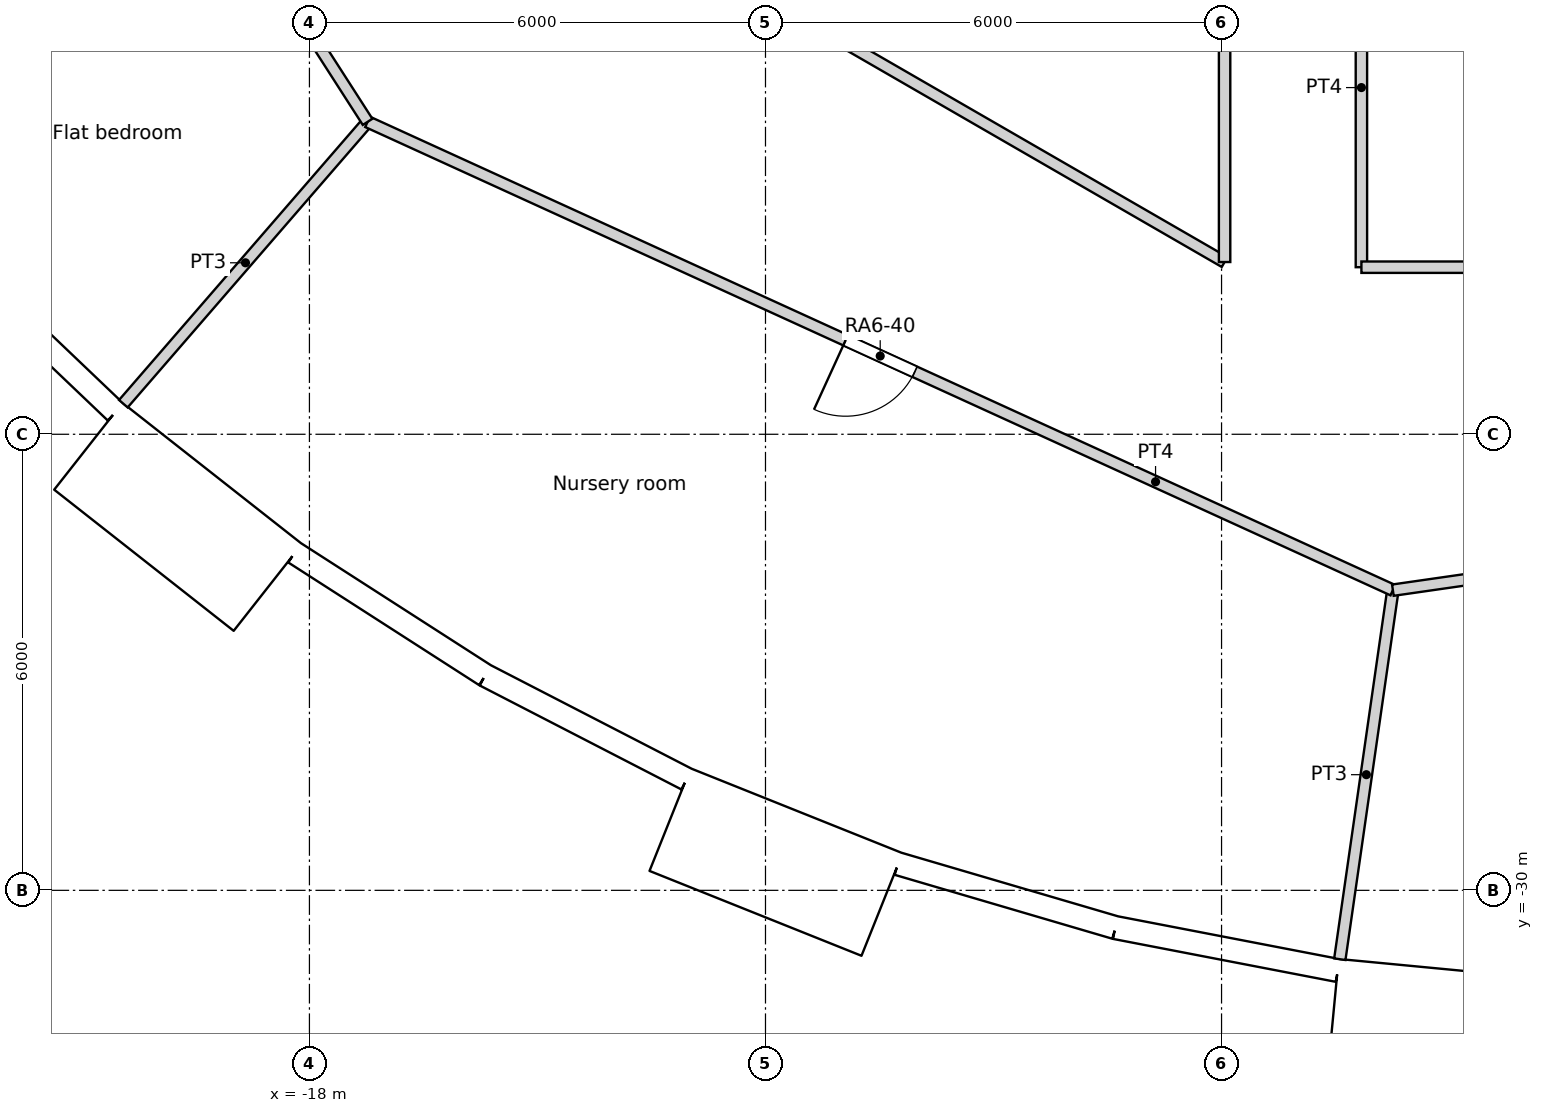
"""IFC4 building model, lengths in metres.
Left out: names, types, materials, properties, quantities, classifications, styles, units other than length and angle.
Written with IfcOpenShell. Run it as: python <this file> out.ifc"""

import sys

from ifc_helpers import new_model, si_unit, direction, frame, frame_2d, origin, origin_2d, place, context, subcontext, project, spatial, rectangle, circle, extrude, element, fill, save


model = new_model("IFC4")
c1 = context("Model", 3, precision=1e-05, world=origin(), true_north=direction((0.0, 1.0)))
c2 = subcontext(c1, "Body", "Model", "MODEL_VIEW")
j1 = project(units=[si_unit("LENGTHUNIT", "METRE"), si_unit("PLANEANGLEUNIT", "RADIAN")], contexts=[c1])
p1 = place(None, origin())
s1 = spatial("IfcSite", under=j1, at=p1, CompositionType="ELEMENT")
p2 = place(p1, origin())
s2 = spatial("IfcBuilding", under=s1, at=p2, CompositionType="ELEMENT")
p3 = place(p2, frame((0.0, 0.0, 82.2)))
s3 = spatial("IfcBuildingStorey", under=s2, at=p3, CompositionType="ELEMENT", Elevation=82.2)
for number, where, z_axis, x_axis in (
    (1, (-19.826, -22.88, 0.0), (0.0, 0.0, 1.0), (1.0, 0.0, 0.0)),
    (2, (-15.137, -26.219, 0.0), (0.0, 0.0, 1.0), (1.0, 0.0, 0.0)),
    (3, (-9.902, -28.61, 0.0), (0.0, 0.0, 1.0), (1.0, 0.0, 0.0)),
    (4, (-4.309, -29.966, 0.0), (0.0, 0.0, 1.0), (1.0, 0.0, 0.0)),
):
    element("IfcColumn", number, at=place(p3, frame(where, z_axis=z_axis, x_axis=x_axis)), inside=s3, PredefinedType="COLUMN", context=c2, shape_type="SweptSolid", body=[
        extrude(circle(Radius=0.6, at=origin_2d()), origin(), (0.0, 0.0, 1.0), 3.6),
    ])
for number, where, z_axis, x_axis in (
    (5, (-12.274, -21.259, 0.0), (0.0, 0.0, 1.0), (1.0, 0.0, 0.0)),
    (6, (-7.04, -23.516, 0.0), (0.0, 0.0, 1.0), (1.0, 0.0, 0.0)),
):
    element("IfcColumn", number, at=place(p3, frame(where, z_axis=z_axis, x_axis=x_axis)), inside=s3, PredefinedType="COLUMN", context=c2, shape_type="SweptSolid", body=[
        extrude(circle(Radius=0.65, at=origin_2d()), origin(), (0.0, 0.0, 1.0), 3.6),
    ])
p4 = place(p3, frame((-4.188, -18.35, 0.0), z_axis=(0.0, 0.0, 1.0), x_axis=(1.0, 0.0, 0.0)))
e7 = element("IfcColumn", 7, at=p4, inside=s3, PredefinedType="COLUMN", context=c2, shape_type="SweptSolid", body=[
    extrude(circle(Radius=0.7, at=origin_2d()), origin(), (0.0, 0.0, 1.0), 3.6),
])
p5 = place(p3, frame((-22.707, -21.651, 0.0), z_axis=(0.0, 0.0, 1.0), x_axis=(0.723744206617, -0.690068346896, 0.0)))
e8 = element("IfcWall", 8, at=p5, inside=s3, PredefinedType="SOLIDWALL", context=c2, shape_type="SweptSolid", body=[
    extrude(rectangle(XDim=2.98, YDim=0.3, at=frame_2d((1.49, 0.0))), origin(), (0.0, 0.0, 1.0), 3.15),
])
p6 = place(p5, frame((1.49, 0.0, 1.55)))
e9 = element("IfcOpeningElement", 9, at=p6, cuts=e8, PredefinedType="OPENING", context=c2, shape_type="SweptSolid", body=[
    extrude(circle(Radius=0.9, at=origin_2d()), frame((0.0, 0.16, 0.0), z_axis=(0.0, -1.0, 0.0), x_axis=(1.0, 0.0, 0.0)), (0.0, 0.0, 1.0), 0.32),
])
p7 = place(p3, frame((-20.907, -24.159, -0.45), z_axis=(0.0, 0.0, 1.0), x_axis=(0.786049992888, -0.618162930529, 0.0)))
e10 = element("IfcWall", 10, at=p7, inside=s3, PredefinedType="ELEMENTEDWALL", context=c2, shape_type="SweptSolid", body=[
    extrude(rectangle(XDim=3.0, YDim=1.45, at=frame_2d((1.5, 0.0))), origin(), (0.0, 0.0, 1.0), 3.6),
])
p8 = place(p7, frame((1.5, 0.0, 2.0)))
e11 = element("IfcOpeningElement", 11, at=p8, cuts=e10, PredefinedType="OPENING", context=c2, shape_type="SweptSolid", body=[
    extrude(circle(Radius=0.9, at=origin_2d()), frame((0.0, 0.735, 0.0), z_axis=(0.0, -1.0, 0.0), x_axis=(1.0, 0.0, 0.0)), (0.0, 0.0, 1.0), 1.47),
])
p9 = place(p3, frame((-18.194, -25.56, 0.0), z_axis=(0.0, 0.0, 1.0), x_axis=(0.84122372879, -0.540687190639, 0.0)))
e12 = element("IfcWall", 12, at=p9, inside=s3, PredefinedType="SOLIDWALL", context=c2, shape_type="SweptSolid", body=[
    extrude(rectangle(XDim=2.98, YDim=0.3, at=frame_2d((1.49, 0.0))), origin(), (0.0, 0.0, 1.0), 3.15),
])
p10 = place(p9, frame((1.49, 0.0, 1.55)))
e13 = element("IfcOpeningElement", 13, at=p10, cuts=e12, PredefinedType="OPENING", context=c2, shape_type="SweptSolid", body=[
    extrude(circle(Radius=0.9, at=origin_2d()), frame((0.0, 0.16, 0.0), z_axis=(0.0, -1.0, 0.0), x_axis=(1.0, 0.0, 0.0)), (0.0, 0.0, 1.0), 0.32),
])
p11 = place(p3, frame((-15.687, -27.171, 0.0), z_axis=(0.0, 0.0, 1.0), x_axis=(0.888853225096, -0.4581920386, 0.0)))
e14 = element("IfcWall", 14, at=p11, inside=s3, PredefinedType="SOLIDWALL", context=c2, shape_type="SweptSolid", body=[
    extrude(rectangle(XDim=2.979, YDim=0.3, at=frame_2d((1.49, 0.0))), origin(), (0.0, 0.0, 1.0), 3.15),
])
p12 = place(p11, frame((1.49, 0.0, 1.55)))
e15 = element("IfcOpeningElement", 15, at=p12, cuts=e14, PredefinedType="OPENING", context=c2, shape_type="SweptSolid", body=[
    extrude(circle(Radius=0.9, at=origin_2d()), frame((0.0, 0.16, 0.0), z_axis=(0.0, -1.0, 0.0), x_axis=(1.0, 0.0, 0.0)), (0.0, 0.0, 1.0), 0.32),
])
p13 = place(p3, frame((-13.254, -29.07, -0.45), z_axis=(0.0, 0.0, 1.0), x_axis=(0.928358776184, -0.371685327504, 0.0)))
e16 = element("IfcWall", 16, at=p13, inside=s3, PredefinedType="ELEMENTEDWALL", context=c2, shape_type="SweptSolid", body=[
    extrude(rectangle(XDim=3.0, YDim=1.45, at=frame_2d((1.5, 0.0))), origin(), (0.0, 0.0, 1.0), 3.6),
])
p14 = place(p13, frame((1.5, 0.0, 2.0)))
e17 = element("IfcOpeningElement", 17, at=p14, cuts=e16, PredefinedType="OPENING", context=c2, shape_type="SweptSolid", body=[
    extrude(circle(Radius=0.9, at=origin_2d()), frame((0.0, 0.735, 0.0), z_axis=(0.0, -1.0, 0.0), x_axis=(1.0, 0.0, 0.0)), (0.0, 0.0, 1.0), 1.47),
])
p15 = place(p3, frame((-10.256, -29.651, 0.0), z_axis=(0.0, 0.0, 1.0), x_axis=(0.959507586834, -0.28168278401, 0.0)))
e18 = element("IfcWall", 18, at=p15, inside=s3, PredefinedType="SOLIDWALL", context=c2, shape_type="SweptSolid", body=[
    extrude(rectangle(XDim=2.98, YDim=0.3, at=frame_2d((1.49, 0.0))), origin(), (0.0, 0.0, 1.0), 3.15),
])
p16 = place(p15, frame((1.49, 0.0, 1.55)))
e19 = element("IfcOpeningElement", 19, at=p16, cuts=e18, PredefinedType="OPENING", context=c2, shape_type="SweptSolid", body=[
    extrude(circle(Radius=0.9, at=origin_2d()), frame((0.0, 0.16, 0.0), z_axis=(0.0, -1.0, 0.0), x_axis=(1.0, 0.0, 0.0)), (0.0, 0.0, 1.0), 0.32),
])
p17 = place(p3, frame((-7.397, -30.49, 0.0), z_axis=(0.0, 0.0, 1.0), x_axis=(0.981924535406, -0.189272836848, 0.0)))
e20 = element("IfcWall", 20, at=p17, inside=s3, PredefinedType="SOLIDWALL", context=c2, shape_type="SweptSolid", body=[
    extrude(rectangle(XDim=2.98, YDim=0.3, at=frame_2d((1.49, 0.0))), origin(), (0.0, 0.0, 1.0), 3.15),
])
p18 = place(p17, frame((1.49, 0.0, 1.55)))
e21 = element("IfcOpeningElement", 21, at=p18, cuts=e20, PredefinedType="OPENING", context=c2, shape_type="SweptSolid", body=[
    extrude(circle(Radius=0.9, at=origin_2d()), frame((0.0, 0.16, 0.0), z_axis=(0.0, -1.0, 0.0), x_axis=(1.0, 0.0, 0.0)), (0.0, 0.0, 1.0), 0.32),
])
p19 = place(p3, frame((-4.527, -31.627, -0.45), z_axis=(0.0, 0.0, 1.0), x_axis=(0.995472768558, -0.09504718333, 0.0)))
e22 = element("IfcWall", 22, at=p19, inside=s3, PredefinedType="ELEMENTEDWALL", context=c2, shape_type="SweptSolid", body=[
    extrude(rectangle(XDim=3.0, YDim=1.45, at=frame_2d((1.5, 0.0))), origin(), (0.0, 0.0, 1.0), 3.6),
])
p20 = place(p19, frame((1.5, 0.0, 2.0)))
e23 = element("IfcOpeningElement", 23, at=p20, cuts=e22, PredefinedType="OPENING", context=c2, shape_type="SweptSolid", body=[
    extrude(circle(Radius=0.9, at=origin_2d()), frame((0.0, 0.735, 0.0), z_axis=(0.0, -1.0, 0.0), x_axis=(1.0, 0.0, 0.0)), (0.0, 0.0, 1.0), 1.47),
])
p21 = place(p3, frame((-25.253, -7.415, 0.0), z_axis=(0.0, 0.0, 1.0), x_axis=(0.540667724156, -0.841236240337, 0.0)))
e24 = element("IfcWall", 24, at=p21, inside=s3, PredefinedType="PARTITIONING", context=c2, shape_type="SweptSolid", body=[
    extrude(rectangle(XDim=14.83, YDim=0.15, at=frame_2d((7.415, 0.0))), origin(), (0.0, 0.0, 1.0), 3.15),
])
p22 = place(p21, frame((5.602, 0.0, 0.0)))
e25 = element("IfcOpeningElement", 25, at=p22, cuts=e24, PredefinedType="OPENING", context=c2, shape_type="SweptSolid", body=[
    extrude(rectangle(XDim=1.0, YDim=2.1, at=frame_2d((0.5, 1.05))), frame((0.0, 0.075, 0.0), z_axis=(0.0, -1.0, 0.0), x_axis=(1.0, 0.0, 0.0)), (0.0, 0.0, 1.0), 0.15),
])
p23 = place(p3, frame((-15.96, -15.96, 0.0), z_axis=(0.0, 0.0, 1.0), x_axis=(0.86602397904, -0.500002467721, 0.0)))
e26 = element("IfcWall", 26, at=p23, inside=s3, PredefinedType="PARTITIONING", context=c2, shape_type="SweptSolid", body=[
    extrude(rectangle(XDim=11.547, YDim=0.15, at=frame_2d((5.774, 0.0))), origin(), (0.0, 0.0, 1.0), 3.15),
])
p24 = place(p3, frame((-5.96, -21.734, 0.0), z_axis=(0.0, 0.0, 1.0), x_axis=(0.0, 1.0, 0.0)))
e27 = element("IfcWall", 27, at=p24, inside=s3, PredefinedType="PARTITIONING", context=c2, shape_type="SweptSolid", body=[
    extrude(rectangle(XDim=9.934, YDim=0.15, at=frame_2d((4.967, 0.0))), origin(), (0.0, 0.0, 1.0), 3.15),
])
p25 = place(p24, frame((4.492, 0.0, 0.0)))
e28 = element("IfcOpeningElement", 28, at=p25, cuts=e27, PredefinedType="OPENING", context=c2, shape_type="SweptSolid", body=[
    extrude(rectangle(XDim=0.95, YDim=2.1, at=frame_2d((0.475, 1.05))), frame((0.0, 0.075, 0.0), z_axis=(0.0, -1.0, 0.0), x_axis=(1.0, 0.0, 0.0)), (0.0, 0.0, 1.0), 0.15),
])
p26 = place(p3, frame((-4.16, -21.802, 0.0), z_axis=(0.0, 0.0, 1.0), x_axis=(0.0, 1.0, 0.0)))
e29 = element("IfcWall", 29, at=p26, inside=s3, PredefinedType="PARTITIONING", context=c2, shape_type="SweptSolid", body=[
    extrude(rectangle(XDim=10.002, YDim=0.15, at=frame_2d((5.001, 0.0))), origin(), (0.0, 0.0, 1.0), 3.15),
])
p27 = place(p26, frame((4.776, 0.0, 0.0)))
e30 = element("IfcOpeningElement", 30, at=p27, cuts=e29, PredefinedType="OPENING", context=c2, shape_type="SweptSolid", body=[
    extrude(rectangle(XDim=0.95, YDim=2.1, at=frame_2d((0.475, 1.05))), frame((0.0, 0.075, 0.0), z_axis=(0.0, -1.0, 0.0), x_axis=(1.0, 0.0, 0.0)), (0.0, 0.0, 1.0), 0.15),
])
p28 = place(p3, frame((-4.16, -21.802, 0.0), z_axis=(0.0, 0.0, 1.0), x_axis=(1.0, 0.0, 0.0)))
e31 = element("IfcWall", 31, at=p28, inside=s3, PredefinedType="PARTITIONING", context=c2, shape_type="SweptSolid", body=[
    extrude(rectangle(XDim=7.736, YDim=0.15, at=frame_2d((3.868, 0.0))), origin(), (0.0, 0.0, 1.0), 3.15),
])
p29 = place(p3, frame((-17.235, -19.89, 0.0), z_axis=(0.0, 0.0, 1.0), x_axis=(0.90960889055, -0.415465601743, 0.0)))
e32 = element("IfcWall", 32, at=p29, inside=s3, PredefinedType="PARTITIONING", context=c2, shape_type="SweptSolid", body=[
    extrude(rectangle(XDim=14.829, YDim=0.15, at=frame_2d((7.415, 0.0))), origin(), (0.0, 0.0, 1.0), 3.15),
])
p30 = place(p29, frame((6.914, 0.0, 0.0)))
e33 = element("IfcOpeningElement", 33, at=p30, cuts=e32, PredefinedType="OPENING", context=c2, shape_type="SweptSolid", body=[
    extrude(rectangle(XDim=1.0, YDim=2.04, at=frame_2d((0.5, 1.02))), frame((0.0, 0.075, 0.0), z_axis=(0.0, -1.0, 0.0), x_axis=(1.0, 0.0, 0.0)), (0.0, 0.0, 1.0), 0.15),
])
p31 = place(p3, frame((-3.746, -26.051, 0.0), z_axis=(0.0, 0.0, 1.0), x_axis=(0.98981637125, 0.142350100825, 0.0)))
e34 = element("IfcWall", 34, at=p31, inside=s3, PredefinedType="PARTITIONING", context=c2, shape_type="SweptSolid", body=[
    extrude(rectangle(XDim=14.83, YDim=0.15, at=frame_2d((7.415, 0.0))), origin(), (0.0, 0.0, 1.0), 3.15),
])
p32 = place(p31, frame((6.115, 0.0, 0.0)))
e35 = element("IfcOpeningElement", 35, at=p32, cuts=e34, PredefinedType="OPENING", context=c2, shape_type="SweptSolid", body=[
    extrude(rectangle(XDim=1.0, YDim=2.04, at=frame_2d((0.5, 1.02))), frame((0.0, 0.075, 0.0), z_axis=(0.0, -1.0, 0.0), x_axis=(1.0, 0.0, 0.0)), (0.0, 0.0, 1.0), 0.15),
])
p33 = place(p3, frame((-20.448, -23.598, 0.0), z_axis=(0.0, 0.0, 1.0), x_axis=(0.654847179409, 0.755761319214, 0.0)))
e36 = element("IfcWall", 36, at=p33, inside=s3, PredefinedType="PARTITIONING", context=c2, shape_type="SweptSolid", body=[
    extrude(rectangle(XDim=4.906, YDim=0.15, at=frame_2d((2.453, 0.0))), origin(), (0.0, 0.0, 1.0), 3.15),
])
p34 = place(p3, frame((-4.444, -30.906, 0.0), z_axis=(0.0, 0.0, 1.0), x_axis=(0.142306296561, 0.989822669956, 0.0)))
e37 = element("IfcWall", 37, at=p34, inside=s3, PredefinedType="PARTITIONING", context=c2, shape_type="SweptSolid", body=[
    extrude(rectangle(XDim=4.905, YDim=0.15, at=frame_2d((2.452, 0.0))), origin(), (0.0, 0.0, 1.0), 3.15),
])
p35 = place(p6, origin())
e38 = element("IfcWindow", 38, at=p35, inside=s3, PartitioningType="SINGLE_PANEL", PredefinedType="WINDOW", context=c2, shape_type="SweptSolid", body=[
    extrude(circle(Radius=0.9, at=origin_2d()), frame((0.0, 0.12, 0.0), z_axis=(0.0, -1.0, 0.0), x_axis=(1.0, 0.0, 0.0)), (0.0, 0.0, 1.0), 0.1),
])
fill(e9, e38)
p36 = place(p8, origin())
e39 = element("IfcWindow", 39, at=p36, inside=s3, PartitioningType="SINGLE_PANEL", PredefinedType="WINDOW", context=c2, shape_type="SweptSolid", body=[
    extrude(circle(Radius=0.9, at=origin_2d()), frame((0.0, 0.695, 0.0), z_axis=(0.0, -1.0, 0.0), x_axis=(1.0, 0.0, 0.0)), (0.0, 0.0, 1.0), 0.1),
])
fill(e11, e39)
p37 = place(p10, origin())
e40 = element("IfcWindow", 40, at=p37, inside=s3, PartitioningType="SINGLE_PANEL", PredefinedType="WINDOW", context=c2, shape_type="SweptSolid", body=[
    extrude(circle(Radius=0.9, at=origin_2d()), frame((0.0, 0.12, 0.0), z_axis=(0.0, -1.0, 0.0), x_axis=(1.0, 0.0, 0.0)), (0.0, 0.0, 1.0), 0.1),
])
fill(e13, e40)
p38 = place(p12, origin())
e41 = element("IfcWindow", 41, at=p38, inside=s3, PartitioningType="SINGLE_PANEL", PredefinedType="WINDOW", context=c2, shape_type="SweptSolid", body=[
    extrude(circle(Radius=0.9, at=origin_2d()), frame((0.0, 0.12, 0.0), z_axis=(0.0, -1.0, 0.0), x_axis=(1.0, 0.0, 0.0)), (0.0, 0.0, 1.0), 0.1),
])
fill(e15, e41)
p39 = place(p14, origin())
e42 = element("IfcWindow", 42, at=p39, inside=s3, PartitioningType="SINGLE_PANEL", PredefinedType="WINDOW", context=c2, shape_type="SweptSolid", body=[
    extrude(circle(Radius=0.9, at=origin_2d()), frame((0.0, 0.695, 0.0), z_axis=(0.0, -1.0, 0.0), x_axis=(1.0, 0.0, 0.0)), (0.0, 0.0, 1.0), 0.1),
])
fill(e17, e42)
p40 = place(p16, origin())
e43 = element("IfcWindow", 43, at=p40, inside=s3, PartitioningType="SINGLE_PANEL", PredefinedType="WINDOW", context=c2, shape_type="SweptSolid", body=[
    extrude(circle(Radius=0.9, at=origin_2d()), frame((0.0, 0.12, 0.0), z_axis=(0.0, -1.0, 0.0), x_axis=(1.0, 0.0, 0.0)), (0.0, 0.0, 1.0), 0.1),
])
fill(e19, e43)
p41 = place(p18, origin())
e44 = element("IfcWindow", 44, at=p41, inside=s3, PartitioningType="SINGLE_PANEL", PredefinedType="WINDOW", context=c2, shape_type="SweptSolid", body=[
    extrude(circle(Radius=0.9, at=origin_2d()), frame((0.0, 0.12, 0.0), z_axis=(0.0, -1.0, 0.0), x_axis=(1.0, 0.0, 0.0)), (0.0, 0.0, 1.0), 0.1),
])
fill(e21, e44)
p42 = place(p20, origin())
e45 = element("IfcWindow", 45, at=p42, inside=s3, PartitioningType="SINGLE_PANEL", PredefinedType="WINDOW", context=c2, shape_type="SweptSolid", body=[
    extrude(circle(Radius=0.9, at=origin_2d()), frame((0.0, 0.695, 0.0), z_axis=(0.0, -1.0, 0.0), x_axis=(1.0, 0.0, 0.0)), (0.0, 0.0, 1.0), 0.1),
])
fill(e23, e45)
p43 = place(p30, origin())
e46 = element("IfcDoor", 46, at=p43, inside=s3, OperationType="SINGLE_SWING_RIGHT", PredefinedType="DOOR", context=c2, shape_type="SweptSolid", body=[
    extrude(rectangle(XDim=1.0, YDim=2.04, at=frame_2d((0.5, 1.02))), frame((0.0, 0.025, 0.0), z_axis=(0.0, -1.0, 0.0), x_axis=(1.0, 0.0, 0.0)), (0.0, 0.0, 1.0), 0.05),
])
fill(e33, e46)
save(model, sys.argv[1])
